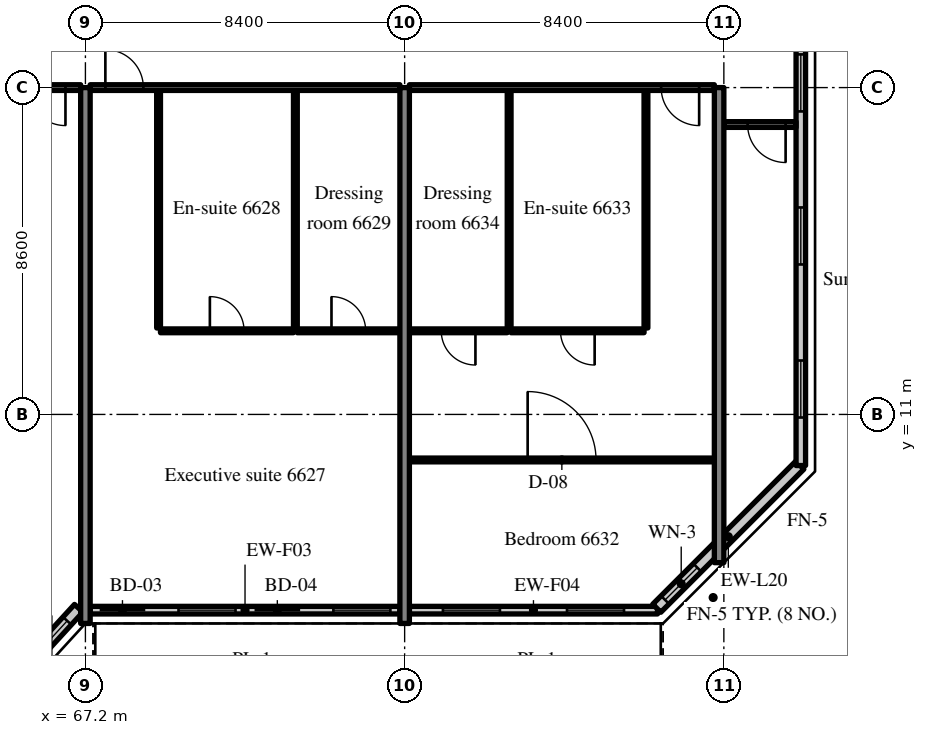
"""IFC4 building model, lengths in metres.
Left out: names, types, materials, properties, quantities, classifications, styles, units other than length and angle.
Written with IfcOpenShell. Run it as: python <this file> out.ifc"""

import sys

from ifc_helpers import new_model, si_unit, direction, frame, frame_2d, origin, place, context, subcontext, project, spatial, rectangle, extrude, source, transform, mapped, element, fill, save


model = new_model("IFC4")
c1 = context("Model", 3, precision=1e-05, world=origin(), true_north=direction((0.0, 1.0)))
c2 = subcontext(c1, "Body", "Model", "MODEL_VIEW")
j1 = project(units=[si_unit("LENGTHUNIT", "METRE"), si_unit("PLANEANGLEUNIT", "RADIAN")], contexts=[c1])
p1 = place(None, origin())
s1 = spatial("IfcSite", under=j1, at=p1, CompositionType="ELEMENT")
p2 = place(p1, origin())
s2 = spatial("IfcBuilding", under=s1, at=p2, CompositionType="ELEMENT")
p3 = place(p2, frame((0.0, 0.0, 277.7)))
s3 = spatial("IfcBuildingStorey", under=s2, at=p3, CompositionType="ELEMENT", Elevation=277.7)
m1 = source(origin(), c2, "Body", "SweptSolid", [
    extrude(rectangle(XDim=14.1, YDim=0.25, at=frame_2d((7.05, 0.0))), origin(), (0.0, 0.0, 1.0), 3.72),
])
for number, where, z_axis, x_axis in (
    (1, (67.2, 5.5, 0.0), (0.0, 0.0, 1.0), (0.0, 1.0, 0.0)),
    (2, (75.6, 5.5, 0.0), (0.0, 0.0, 1.0), (0.0, 1.0, 0.0)),
):
    element("IfcWall", number, at=place(p3, frame(where, z_axis=z_axis, x_axis=x_axis)), inside=s3, PredefinedType="SHEAR", context=c2, shape_type="MappedRepresentation", body=[
        mapped(m1, transform((0.0, 0.0, 0.0), scale=1.0)),
    ])
m2 = source(origin(), c2, "Body", "SweptSolid", [
    extrude(rectangle(XDim=12.5, YDim=0.25, at=frame_2d((6.25, 0.0))), origin(), (0.0, 0.0, 1.0), 3.72),
])
p4 = place(p3, frame((83.875, 7.1, 0.0), z_axis=(0.0, 0.0, 1.0), x_axis=(0.0, 1.0, 0.0)))
e3 = element("IfcWall", 3, at=p4, inside=s3, PredefinedType="SHEAR", context=c2, shape_type="MappedRepresentation", body=[
    mapped(m2, transform((0.0, 0.0, 0.0), scale=1.0)),
])
m3 = source(origin(), c2, "Body", "SweptSolid", [
    extrude(rectangle(XDim=2.398, YDim=0.3, at=frame_2d((1.199, 0.0))), origin(), (0.0, 0.0, 1.0), 3.72),
])
p5 = place(p3, frame((65.404, 4.131, 0.0), z_axis=(0.0, 0.0, 1.0), x_axis=(0.675374189419, 0.737475222815, 0.0)))
e4 = element("IfcWall", 4, at=p5, inside=s3, PredefinedType="SOLIDWALL", context=c2, shape_type="MappedRepresentation", body=[
    mapped(m3, transform((0.0, 0.0, 0.0), scale=1.0)),
])
m4 = source(origin(), c2, "Body", "SweptSolid", [
    extrude(rectangle(XDim=1.5, YDim=2.0, at=frame_2d((0.75, 1.0))), frame((0.0, 0.16, 0.0), z_axis=(0.0, -1.0, 0.0), x_axis=(1.0, 0.0, 0.0)), (0.0, 0.0, 1.0), 0.32),
])
p6 = place(p5, frame((0.449, 0.0, 0.9)))
e5 = element("IfcOpeningElement", 5, at=p6, cuts=e4, PredefinedType="OPENING", context=c2, shape_type="MappedRepresentation", body=[
    mapped(m4, transform((0.0, 0.0, 0.0), scale=1.0)),
])
m5 = source(origin(), c2, "Body", "SweptSolid", [
    extrude(rectangle(XDim=8.15, YDim=0.2, at=frame_2d((4.075, 0.0))), origin(), (0.0, 0.0, 1.0), 3.17),
])
p7 = place(p3, frame((67.325, 5.85, 0.0), z_axis=(0.0, 0.0, 1.0), x_axis=(1.0, 0.0, 0.0)))
e6 = element("IfcWall", 6, at=p7, inside=s3, PredefinedType="SOLIDWALL", context=c2, shape_type="MappedRepresentation", body=[
    mapped(m5, transform((0.0, 0.0, 0.0), scale=1.0)),
])
m6 = source(origin(), c2, "Body", "SweptSolid", [
    extrude(rectangle(XDim=1.2, YDim=2.4, at=frame_2d((0.6, 1.2))), frame((0.0, 0.11, 0.0), z_axis=(0.0, -1.0, 0.0), x_axis=(1.0, 0.0, 0.0)), (0.0, 0.0, 1.0), 0.22),
])
p8 = place(p7, frame((0.25, 0.0, 0.0)))
e7 = element("IfcOpeningElement", 7, at=p8, cuts=e6, PredefinedType="OPENING", context=c2, shape_type="MappedRepresentation", body=[
    mapped(m6, transform((0.0, 0.0, 0.0), scale=1.0)),
])
m7 = source(origin(), c2, "Body", "SweptSolid", [
    extrude(rectangle(XDim=1.5, YDim=1.5, at=frame_2d((0.75, 0.75))), frame((0.0, 0.11, 0.0), z_axis=(0.0, -1.0, 0.0), x_axis=(1.0, 0.0, 0.0)), (0.0, 0.0, 1.0), 0.22),
])
p9 = place(p7, frame((2.325, 0.0, 0.9)))
e8 = element("IfcOpeningElement", 8, at=p9, cuts=e6, PredefinedType="OPENING", context=c2, shape_type="MappedRepresentation", body=[
    mapped(m7, transform((0.0, 0.0, 0.0), scale=1.0)),
])
p10 = place(p7, frame((4.325, 0.0, 0.0)))
e9 = element("IfcOpeningElement", 9, at=p10, cuts=e6, PredefinedType="OPENING", context=c2, shape_type="MappedRepresentation", body=[
    mapped(m6, transform((0.0, 0.0, 0.0), scale=1.0)),
])
p11 = place(p7, frame((6.4, 0.0, 0.9)))
e10 = element("IfcOpeningElement", 10, at=p11, cuts=e6, PredefinedType="OPENING", context=c2, shape_type="MappedRepresentation", body=[
    mapped(m7, transform((0.0, 0.0, 0.0), scale=1.0)),
])
m8 = source(origin(), c2, "Body", "SweptSolid", [
    extrude(rectangle(XDim=6.53, YDim=0.2, at=frame_2d((3.265, 0.0))), origin(), (0.0, 0.0, 1.0), 3.17),
])
p12 = place(p3, frame((75.725, 5.85, 0.0), z_axis=(0.0, 0.0, 1.0), x_axis=(1.0, 0.0, 0.0)))
e11 = element("IfcWall", 11, at=p12, inside=s3, PredefinedType="SOLIDWALL", context=c2, shape_type="MappedRepresentation", body=[
    mapped(m8, transform((0.0, 0.0, 0.0), scale=1.0)),
])
p13 = place(p12, frame((0.883, 0.0, 0.9)))
e12 = element("IfcOpeningElement", 12, at=p13, cuts=e11, PredefinedType="OPENING", context=c2, shape_type="MappedRepresentation", body=[
    mapped(m7, transform((0.0, 0.0, 0.0), scale=1.0)),
])
p14 = place(p12, frame((4.147, 0.0, 0.9)))
e13 = element("IfcOpeningElement", 13, at=p14, cuts=e11, PredefinedType="OPENING", context=c2, shape_type="MappedRepresentation", body=[
    mapped(m7, transform((0.0, 0.0, 0.0), scale=1.0)),
])
m9 = source(origin(), c2, "Body", "SweptSolid", [
    extrude(rectangle(XDim=5.326, YDim=0.3, at=frame_2d((2.663, 0.0))), origin(), (0.0, 0.0, 1.0), 3.72),
])
p15 = place(p3, frame((82.234, 5.9, 0.0), z_axis=(0.0, 0.0, 1.0), x_axis=(0.707083859269, 0.707129702361, 0.0)))
e14 = element("IfcWall", 14, at=p15, inside=s3, PredefinedType="SOLIDWALL", context=c2, shape_type="MappedRepresentation", body=[
    mapped(m9, transform((0.0, 0.0, 0.0), scale=1.0)),
])
m10 = source(origin(), c2, "Body", "SweptSolid", [
    extrude(rectangle(XDim=1.2, YDim=1.5, at=frame_2d((0.6, 0.75))), frame((0.0, 0.16, 0.0), z_axis=(0.0, -1.0, 0.0), x_axis=(1.0, 0.0, 0.0)), (0.0, 0.0, 1.0), 0.32),
])
p16 = place(p15, frame((0.31, 0.0, 0.9)))
e15 = element("IfcOpeningElement", 15, at=p16, cuts=e14, PredefinedType="OPENING", context=c2, shape_type="MappedRepresentation", body=[
    mapped(m10, transform((0.0, 0.0, 0.0), scale=1.0)),
])
m11 = source(origin(), c2, "Body", "SweptSolid", [
    extrude(rectangle(XDim=28.189, YDim=0.25, at=frame_2d((14.095, 0.0))), origin(), (0.0, 0.0, 1.0), 3.72),
])
p17 = place(p3, frame((86.025, 9.655, 0.0), z_axis=(0.0, 0.0, 1.0), x_axis=(0.0, 1.0, 0.0)))
e16 = element("IfcWall", 16, at=p17, inside=s3, PredefinedType="SOLIDWALL", context=c2, shape_type="MappedRepresentation", body=[
    mapped(m11, transform((0.0, 0.0, 0.0), scale=1.0)),
])
m12 = source(origin(), c2, "Body", "SweptSolid", [
    extrude(rectangle(XDim=1.5, YDim=1.5, at=frame_2d((0.75, 0.75))), frame((0.0, 0.135, 0.0), z_axis=(0.0, -1.0, 0.0), x_axis=(1.0, 0.0, 0.0)), (0.0, 0.0, 1.0), 0.27),
])
p18 = place(p17, frame((1.263, 0.0, 0.9)))
e17 = element("IfcOpeningElement", 17, at=p18, cuts=e16, PredefinedType="OPENING", context=c2, shape_type="MappedRepresentation", body=[
    mapped(m12, transform((0.0, 0.0, 0.0), scale=1.0)),
])
p19 = place(p17, frame((5.291, 0.0, 0.9)))
e18 = element("IfcOpeningElement", 18, at=p19, cuts=e16, PredefinedType="OPENING", context=c2, shape_type="MappedRepresentation", body=[
    mapped(m12, transform((0.0, 0.0, 0.0), scale=1.0)),
])
p20 = place(p17, frame((9.318, 0.0, 0.9)))
e19 = element("IfcOpeningElement", 19, at=p20, cuts=e16, PredefinedType="OPENING", context=c2, shape_type="MappedRepresentation", body=[
    mapped(m12, transform((0.0, 0.0, 0.0), scale=1.0)),
])
p21 = place(p17, frame((13.345, 0.0, 0.9)))
e20 = element("IfcOpeningElement", 20, at=p21, cuts=e16, PredefinedType="OPENING", context=c2, shape_type="MappedRepresentation", body=[
    mapped(m12, transform((0.0, 0.0, 0.0), scale=1.0)),
])
p22 = place(p17, frame((17.372, 0.0, 0.9)))
e21 = element("IfcOpeningElement", 21, at=p22, cuts=e16, PredefinedType="OPENING", context=c2, shape_type="MappedRepresentation", body=[
    mapped(m12, transform((0.0, 0.0, 0.0), scale=1.0)),
])
p23 = place(p17, frame((21.399, 0.0, 0.9)))
e22 = element("IfcOpeningElement", 22, at=p23, cuts=e16, PredefinedType="OPENING", context=c2, shape_type="MappedRepresentation", body=[
    mapped(m12, transform((0.0, 0.0, 0.0), scale=1.0)),
])
p24 = place(p17, frame((25.426, 0.0, 0.9)))
e23 = element("IfcOpeningElement", 23, at=p24, cuts=e16, PredefinedType="OPENING", context=c2, shape_type="MappedRepresentation", body=[
    mapped(m12, transform((0.0, 0.0, 0.0), scale=1.0)),
])
m13 = source(origin(), c2, "Body", "SweptSolid", [
    extrude(rectangle(XDim=8.15, YDim=0.15, at=frame_2d((4.075, 0.0))), origin(), (0.0, 0.0, 1.0), 3.02),
])
p25 = place(p3, frame((58.925, 19.6, 0.0), z_axis=(0.0, 0.0, 1.0), x_axis=(1.0, 0.0, 0.0)))
e24 = element("IfcWall", 24, at=p25, inside=s3, PredefinedType="PARTITIONING", context=c2, shape_type="MappedRepresentation", body=[
    mapped(m13, transform((0.0, 0.0, 0.0), scale=1.0)),
])
m14 = source(origin(), c2, "Body", "SweptSolid", [
    extrude(rectangle(XDim=1.0, YDim=2.1, at=frame_2d((0.5, 1.05))), frame((0.0, 0.085, 0.0), z_axis=(0.0, -1.0, 0.0), x_axis=(1.0, 0.0, 0.0)), (0.0, 0.0, 1.0), 0.17),
])
p26 = place(p25, frame((6.75, 0.0, 0.0)))
e25 = element("IfcOpeningElement", 25, at=p26, cuts=e24, PredefinedType="OPENING", context=c2, shape_type="MappedRepresentation", body=[
    mapped(m14, transform((0.0, 0.0, 0.0), scale=1.0)),
])
m15 = source(origin(), c2, "Body", "SweptSolid", [
    extrude(rectangle(XDim=6.25, YDim=0.1, at=frame_2d((3.125, 0.0))), origin(), (0.0, 0.0, 1.0), 3.72),
])
for number, where, z_axis, x_axis in (
    (26, (69.125, 13.275, 0.0), (0.0, 0.0, 1.0), (0.0, 1.0, 0.0)),
    (27, (72.725, 13.275, 0.0), (0.0, 0.0, 1.0), (0.0, 1.0, 0.0)),
):
    element("IfcWall", number, at=place(p3, frame(where, z_axis=z_axis, x_axis=x_axis)), inside=s3, PredefinedType="PARTITIONING", context=c2, shape_type="MappedRepresentation", body=[
        mapped(m15, transform((0.0, 0.0, 0.0), scale=1.0)),
    ])
m16 = source(origin(), c2, "Body", "SweptSolid", [
    extrude(rectangle(XDim=3.5, YDim=0.1, at=frame_2d((1.75, 0.0))), origin(), (0.0, 0.0, 1.0), 3.72),
])
p27 = place(p3, frame((69.175, 13.2, 0.0), z_axis=(0.0, 0.0, 1.0), x_axis=(1.0, 0.0, 0.0)))
e28 = element("IfcWall", 28, at=p27, inside=s3, PredefinedType="PARTITIONING", context=c2, shape_type="MappedRepresentation", body=[
    mapped(m16, transform((0.0, 0.0, 0.0), scale=1.0)),
])
m17 = source(origin(), c2, "Body", "SweptSolid", [
    extrude(rectangle(XDim=0.9, YDim=2.1, at=frame_2d((0.45, 1.05))), frame((0.0, 0.06, 0.0), z_axis=(0.0, -1.0, 0.0), x_axis=(1.0, 0.0, 0.0)), (0.0, 0.0, 1.0), 0.12),
])
p28 = place(p27, frame((1.3, 0.0, 0.0)))
e29 = element("IfcOpeningElement", 29, at=p28, cuts=e28, PredefinedType="OPENING", context=c2, shape_type="MappedRepresentation", body=[
    mapped(m17, transform((0.0, 0.0, 0.0), scale=1.0)),
])
m18 = source(origin(), c2, "Body", "SweptSolid", [
    extrude(rectangle(XDim=2.7, YDim=0.1, at=frame_2d((1.35, 0.0))), origin(), (0.0, 0.0, 1.0), 3.72),
])
p29 = place(p3, frame((72.775, 13.2, 0.0), z_axis=(0.0, 0.0, 1.0), x_axis=(1.0, 0.0, 0.0)))
e30 = element("IfcWall", 30, at=p29, inside=s3, PredefinedType="PARTITIONING", context=c2, shape_type="MappedRepresentation", body=[
    mapped(m18, transform((0.0, 0.0, 0.0), scale=1.0)),
])
p30 = place(p29, frame((0.9, 0.0, 0.0)))
e31 = element("IfcOpeningElement", 31, at=p30, cuts=e30, PredefinedType="OPENING", context=c2, shape_type="MappedRepresentation", body=[
    mapped(m17, transform((0.0, 0.0, 0.0), scale=1.0)),
])
m19 = source(origin(), c2, "Body", "SweptSolid", [
    extrude(rectangle(XDim=8.15, YDim=0.15, at=frame_2d((4.075, 0.0))), origin(), (0.0, 0.0, 1.0), 3.02),
])
p31 = place(p3, frame((67.325, 19.6, 0.0), z_axis=(0.0, 0.0, 1.0), x_axis=(1.0, 0.0, 0.0)))
e32 = element("IfcWall", 32, at=p31, inside=s3, PredefinedType="PARTITIONING", context=c2, shape_type="MappedRepresentation", body=[
    mapped(m19, transform((0.0, 0.0, 0.0), scale=1.0)),
])
p32 = place(p31, frame((0.4, 0.0, 0.0)))
e33 = element("IfcOpeningElement", 33, at=p32, cuts=e32, PredefinedType="OPENING", context=c2, shape_type="MappedRepresentation", body=[
    mapped(m14, transform((0.0, 0.0, 0.0), scale=1.0)),
])
for number, where, z_axis, x_axis in (
    (34, (81.95, 13.275, 0.0), (0.0, 0.0, 1.0), (0.0, 1.0, 0.0)),
    (35, (78.35, 13.275, 0.0), (0.0, 0.0, 1.0), (0.0, 1.0, 0.0)),
):
    element("IfcWall", number, at=place(p3, frame(where, z_axis=z_axis, x_axis=x_axis)), inside=s3, PredefinedType="PARTITIONING", context=c2, shape_type="MappedRepresentation", body=[
        mapped(m15, transform((0.0, 0.0, 0.0), scale=1.0)),
    ])
p33 = place(p3, frame((78.4, 13.2, 0.0), z_axis=(0.0, 0.0, 1.0), x_axis=(1.0, 0.0, 0.0)))
e36 = element("IfcWall", 36, at=p33, inside=s3, PredefinedType="PARTITIONING", context=c2, shape_type="MappedRepresentation", body=[
    mapped(m16, transform((0.0, 0.0, 0.0), scale=1.0)),
])
p34 = place(p33, frame((1.3, 0.0, 0.0)))
e37 = element("IfcOpeningElement", 37, at=p34, cuts=e36, PredefinedType="OPENING", context=c2, shape_type="MappedRepresentation", body=[
    mapped(m17, transform((0.0, 0.0, 0.0), scale=1.0)),
])
m20 = source(origin(), c2, "Body", "SweptSolid", [
    extrude(rectangle(XDim=2.575, YDim=0.1, at=frame_2d((1.288, 0.0))), origin(), (0.0, 0.0, 1.0), 3.72),
])
p35 = place(p3, frame((75.725, 13.2, 0.0), z_axis=(0.0, 0.0, 1.0), x_axis=(1.0, 0.0, 0.0)))
e38 = element("IfcWall", 38, at=p35, inside=s3, PredefinedType="PARTITIONING", context=c2, shape_type="MappedRepresentation", body=[
    mapped(m20, transform((0.0, 0.0, 0.0), scale=1.0)),
])
p36 = place(p35, frame((0.838, 0.0, 0.0)))
e39 = element("IfcOpeningElement", 39, at=p36, cuts=e38, PredefinedType="OPENING", context=c2, shape_type="MappedRepresentation", body=[
    mapped(m17, transform((0.0, 0.0, 0.0), scale=1.0)),
])
m21 = source(origin(), c2, "Body", "SweptSolid", [
    extrude(rectangle(XDim=8.025, YDim=0.1, at=frame_2d((4.012, 0.0))), origin(), (0.0, 0.0, 1.0), 3.72),
])
p37 = place(p3, frame((75.725, 9.802, 0.0), z_axis=(0.0, 0.0, 1.0), x_axis=(1.0, 0.0, 0.0)))
e40 = element("IfcWall", 40, at=p37, inside=s3, PredefinedType="PARTITIONING", context=c2, shape_type="MappedRepresentation", body=[
    mapped(m21, transform((0.0, 0.0, 0.0), scale=1.0)),
])
m22 = source(origin(), c2, "Body", "SweptSolid", [
    extrude(rectangle(XDim=1.8, YDim=2.1, at=frame_2d((0.9, 1.05))), frame((0.0, 0.06, 0.0), z_axis=(0.0, -1.0, 0.0), x_axis=(1.0, 0.0, 0.0)), (0.0, 0.0, 1.0), 0.12),
])
p38 = place(p37, frame((3.112, 0.0, 0.0)))
e41 = element("IfcOpeningElement", 41, at=p38, cuts=e40, PredefinedType="OPENING", context=c2, shape_type="MappedRepresentation", body=[
    mapped(m22, transform((0.0, 0.0, 0.0), scale=1.0)),
])
m23 = source(origin(), c2, "Body", "SweptSolid", [
    extrude(rectangle(XDim=8.025, YDim=0.15, at=frame_2d((4.012, 0.0))), origin(), (0.0, 0.0, 1.0), 3.02),
])
p39 = place(p3, frame((75.725, 19.6, 0.0), z_axis=(0.0, 0.0, 1.0), x_axis=(1.0, 0.0, 0.0)))
e42 = element("IfcWall", 42, at=p39, inside=s3, PredefinedType="PARTITIONING", context=c2, shape_type="MappedRepresentation", body=[
    mapped(m23, transform((0.0, 0.0, 0.0), scale=1.0)),
])
p40 = place(p39, frame((6.625, 0.0, 0.0)))
e43 = element("IfcOpeningElement", 43, at=p40, cuts=e42, PredefinedType="OPENING", context=c2, shape_type="MappedRepresentation", body=[
    mapped(m14, transform((0.0, 0.0, 0.0), scale=1.0)),
])
m24 = source(origin(), c2, "Body", "SweptSolid", [
    extrude(rectangle(XDim=1.9, YDim=0.15, at=frame_2d((0.95, 0.0))), origin(), (0.0, 0.0, 1.0), 3.02),
])
p41 = place(p3, frame((84.0, 18.628, 0.0), z_axis=(0.0, 0.0, 1.0), x_axis=(1.0, 0.0, 0.0)))
e44 = element("IfcWall", 44, at=p41, inside=s3, PredefinedType="PARTITIONING", context=c2, shape_type="MappedRepresentation", body=[
    mapped(m24, transform((0.0, 0.0, 0.0), scale=1.0)),
])
p42 = place(p41, frame((0.625, 0.0, 0.0)))
e45 = element("IfcOpeningElement", 45, at=p42, cuts=e44, PredefinedType="OPENING", context=c2, shape_type="MappedRepresentation", body=[
    mapped(m14, transform((0.0, 0.0, 0.0), scale=1.0)),
])
m25 = source(origin(), c2, "Body", "SweptSolid", [
    extrude(rectangle(XDim=1.5, YDim=2.0, at=frame_2d((0.75, 1.0))), frame((0.0, 0.03, 0.0), z_axis=(0.0, -1.0, 0.0), x_axis=(1.0, 0.0, 0.0)), (0.0, 0.0, 1.0), 0.06),
])
p43 = place(p6, origin())
e46 = element("IfcWindow", 46, at=p43, inside=s3, PartitioningType="SINGLE_PANEL", PredefinedType="WINDOW", context=c2, shape_type="MappedRepresentation", body=[
    mapped(m25, transform((0.0, 0.0, 0.0), scale=1.0)),
])
fill(e5, e46)
m26 = source(origin(), c2, "Body", "SweptSolid", [
    extrude(rectangle(XDim=1.2, YDim=2.4, at=frame_2d((0.6, 1.2))), frame((0.0, 0.025, 0.0), z_axis=(0.0, -1.0, 0.0), x_axis=(1.0, 0.0, 0.0)), (0.0, 0.0, 1.0), 0.05),
])
p44 = place(p8, origin())
e47 = element("IfcDoor", 47, at=p44, inside=s3, OperationType="SLIDING_TO_LEFT", PredefinedType="DOOR", context=c2, shape_type="MappedRepresentation", body=[
    mapped(m26, transform((0.0, 0.0, 0.0), scale=1.0)),
])
fill(e7, e47)
m27 = source(origin(), c2, "Body", "SweptSolid", [
    extrude(rectangle(XDim=1.5, YDim=1.5, at=frame_2d((0.75, 0.75))), frame((0.0, 0.03, 0.0), z_axis=(0.0, -1.0, 0.0), x_axis=(1.0, 0.0, 0.0)), (0.0, 0.0, 1.0), 0.06),
])
p45 = place(p9, origin())
e48 = element("IfcWindow", 48, at=p45, inside=s3, PartitioningType="SINGLE_PANEL", PredefinedType="WINDOW", context=c2, shape_type="MappedRepresentation", body=[
    mapped(m27, transform((0.0, 0.0, 0.0), scale=1.0)),
])
fill(e8, e48)
p46 = place(p10, origin())
e49 = element("IfcDoor", 49, at=p46, inside=s3, OperationType="SLIDING_TO_RIGHT", PredefinedType="DOOR", context=c2, shape_type="MappedRepresentation", body=[
    mapped(m26, transform((0.0, 0.0, 0.0), scale=1.0)),
])
fill(e9, e49)
p47 = place(p11, origin())
e50 = element("IfcWindow", 50, at=p47, inside=s3, PartitioningType="SINGLE_PANEL", PredefinedType="WINDOW", context=c2, shape_type="MappedRepresentation", body=[
    mapped(m27, transform((0.0, 0.0, 0.0), scale=1.0)),
])
fill(e10, e50)
p48 = place(p13, origin())
e51 = element("IfcWindow", 51, at=p48, inside=s3, PartitioningType="SINGLE_PANEL", PredefinedType="WINDOW", context=c2, shape_type="MappedRepresentation", body=[
    mapped(m27, transform((0.0, 0.0, 0.0), scale=1.0)),
])
fill(e12, e51)
p49 = place(p14, origin())
e52 = element("IfcWindow", 52, at=p49, inside=s3, PartitioningType="SINGLE_PANEL", PredefinedType="WINDOW", context=c2, shape_type="MappedRepresentation", body=[
    mapped(m27, transform((0.0, 0.0, 0.0), scale=1.0)),
])
fill(e13, e52)
m28 = source(origin(), c2, "Body", "SweptSolid", [
    extrude(rectangle(XDim=1.2, YDim=1.5, at=frame_2d((0.6, 0.75))), frame((0.0, 0.03, 0.0), z_axis=(0.0, -1.0, 0.0), x_axis=(1.0, 0.0, 0.0)), (0.0, 0.0, 1.0), 0.06),
])
p50 = place(p16, origin())
e53 = element("IfcWindow", 53, at=p50, inside=s3, PartitioningType="SINGLE_PANEL", PredefinedType="WINDOW", context=c2, shape_type="MappedRepresentation", body=[
    mapped(m28, transform((0.0, 0.0, 0.0), scale=1.0)),
])
fill(e15, e53)
p51 = place(p18, origin())
e54 = element("IfcWindow", 54, at=p51, inside=s3, PartitioningType="SINGLE_PANEL", PredefinedType="WINDOW", context=c2, shape_type="MappedRepresentation", body=[
    mapped(m27, transform((0.0, 0.0, 0.0), scale=1.0)),
])
fill(e17, e54)
p52 = place(p19, origin())
e55 = element("IfcWindow", 55, at=p52, inside=s3, PartitioningType="SINGLE_PANEL", PredefinedType="WINDOW", context=c2, shape_type="MappedRepresentation", body=[
    mapped(m27, transform((0.0, 0.0, 0.0), scale=1.0)),
])
fill(e18, e55)
p53 = place(p20, origin())
e56 = element("IfcWindow", 56, at=p53, inside=s3, PartitioningType="SINGLE_PANEL", PredefinedType="WINDOW", context=c2, shape_type="MappedRepresentation", body=[
    mapped(m27, transform((0.0, 0.0, 0.0), scale=1.0)),
])
fill(e19, e56)
m29 = source(origin(), c2, "Body", "SweptSolid", [
    extrude(rectangle(XDim=1.0, YDim=2.1, at=frame_2d((0.5, 1.05))), frame((0.0, 0.025, 0.0), z_axis=(0.0, -1.0, 0.0), x_axis=(1.0, 0.0, 0.0)), (0.0, 0.0, 1.0), 0.05),
])
p54 = place(p26, origin())
e57 = element("IfcDoor", 57, at=p54, inside=s3, OperationType="SINGLE_SWING_RIGHT", PredefinedType="DOOR", context=c2, shape_type="MappedRepresentation", body=[
    mapped(m29, transform((0.0, 0.0, 0.0), scale=1.0)),
])
fill(e25, e57)
m30 = source(origin(), c2, "Body", "SweptSolid", [
    extrude(rectangle(XDim=0.9, YDim=2.1, at=frame_2d((0.45, 1.05))), frame((0.0, 0.025, 0.0), z_axis=(0.0, -1.0, 0.0), x_axis=(1.0, 0.0, 0.0)), (0.0, 0.0, 1.0), 0.05),
])
p55 = place(p28, origin())
e58 = element("IfcDoor", 58, at=p55, inside=s3, OperationType="SINGLE_SWING_LEFT", PredefinedType="DOOR", context=c2, shape_type="MappedRepresentation", body=[
    mapped(m30, transform((0.0, 0.0, 0.0), scale=1.0)),
])
fill(e29, e58)
p56 = place(p30, origin())
e59 = element("IfcDoor", 59, at=p56, inside=s3, OperationType="SINGLE_SWING_LEFT", PredefinedType="DOOR", context=c2, shape_type="MappedRepresentation", body=[
    mapped(m30, transform((0.0, 0.0, 0.0), scale=1.0)),
])
fill(e31, e59)
p57 = place(p32, origin())
e60 = element("IfcDoor", 60, at=p57, inside=s3, OperationType="SINGLE_SWING_LEFT", PredefinedType="DOOR", context=c2, shape_type="MappedRepresentation", body=[
    mapped(m29, transform((0.0, 0.0, 0.0), scale=1.0)),
])
fill(e33, e60)
p58 = place(p34, origin())
e61 = element("IfcDoor", 61, at=p58, inside=s3, OperationType="SINGLE_SWING_RIGHT", PredefinedType="DOOR", context=c2, shape_type="MappedRepresentation", body=[
    mapped(m30, transform((0.0, 0.0, 0.0), scale=1.0)),
])
fill(e37, e61)
p59 = place(p36, origin())
e62 = element("IfcDoor", 62, at=p59, inside=s3, OperationType="SINGLE_SWING_RIGHT", PredefinedType="DOOR", context=c2, shape_type="MappedRepresentation", body=[
    mapped(m30, transform((0.0, 0.0, 0.0), scale=1.0)),
])
fill(e39, e62)
m31 = source(origin(), c2, "Body", "SweptSolid", [
    extrude(rectangle(XDim=1.8, YDim=2.1, at=frame_2d((0.9, 1.05))), frame((0.0, 0.025, 0.0), z_axis=(0.0, -1.0, 0.0), x_axis=(1.0, 0.0, 0.0)), (0.0, 0.0, 1.0), 0.05),
])
p60 = place(p38, origin())
e63 = element("IfcDoor", 63, at=p60, inside=s3, OperationType="DOUBLE_DOOR_SINGLE_SWING", PredefinedType="DOOR", context=c2, shape_type="MappedRepresentation", body=[
    mapped(m31, transform((0.0, 0.0, 0.0), scale=1.0)),
])
fill(e41, e63)
p61 = place(p40, origin())
e64 = element("IfcDoor", 64, at=p61, inside=s3, OperationType="SINGLE_SWING_RIGHT", PredefinedType="DOOR", context=c2, shape_type="MappedRepresentation", body=[
    mapped(m29, transform((0.0, 0.0, 0.0), scale=1.0)),
])
fill(e43, e64)
p62 = place(p42, origin())
e65 = element("IfcDoor", 65, at=p62, inside=s3, OperationType="SINGLE_SWING_RIGHT", PredefinedType="DOOR", context=c2, shape_type="MappedRepresentation", body=[
    mapped(m29, transform((0.0, 0.0, 0.0), scale=1.0)),
])
fill(e45, e65)
save(model, sys.argv[1])
